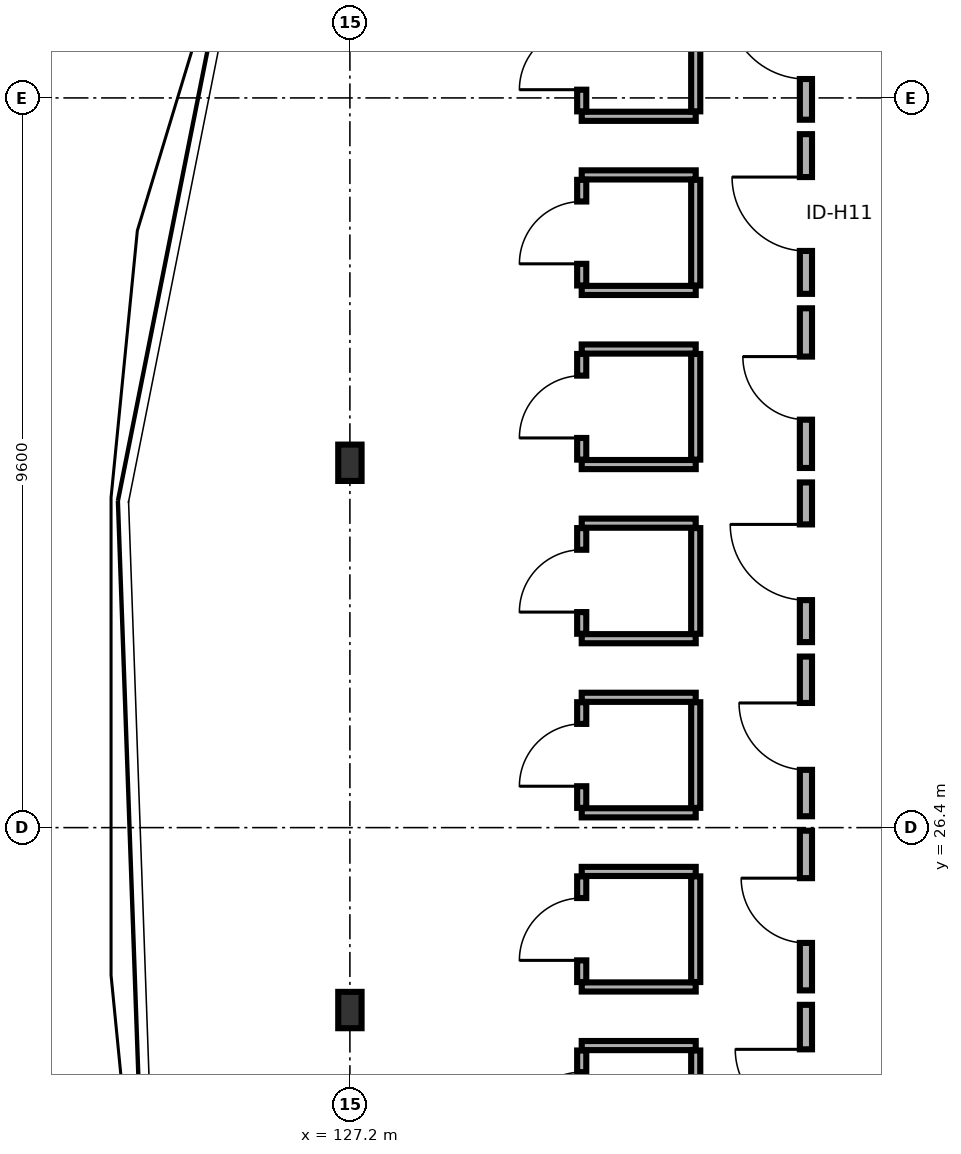
"""IFC4 building model, lengths in metres.
Left out: names, types, materials, properties, quantities, classifications, styles, units other than length and angle.
Written with IfcOpenShell. Run it as: python <this file> out.ifc"""

import sys

from ifc_helpers import new_model, si_unit, direction, frame, frame_2d, origin, origin_2d, place, context, subcontext, project, spatial, rectangle, i_section, extrude, element, fill, save


model = new_model("IFC4")
c1 = context("Model", 3, precision=1e-05, world=origin(), true_north=direction((0.0, 1.0)))
c2 = subcontext(c1, "Body", "Model", "MODEL_VIEW")
j1 = project(units=[si_unit("LENGTHUNIT", "METRE"), si_unit("PLANEANGLEUNIT", "RADIAN")], contexts=[c1])
p1 = place(None, origin())
s1 = spatial("IfcSite", under=j1, at=p1, CompositionType="ELEMENT")
p2 = place(p1, origin())
s2 = spatial("IfcBuilding", under=s1, at=p2, CompositionType="ELEMENT")
p3 = place(p2, frame((0.0, 0.0, 18.1)))
s3 = spatial("IfcBuildingStorey", under=s2, at=p3, CompositionType="ELEMENT", Elevation=18.1)
for number, where, z_axis, x_axis in (
    (1, (127.2, 31.2, 0.0), (0.0, 0.0, 1.0), (1.0, 0.0, 0.0)),
    (2, (127.2, 24.0, 0.0), (0.0, 0.0, 1.0), (1.0, 0.0, 0.0)),
):
    element("IfcColumn", number, at=place(p3, frame(where, z_axis=z_axis, x_axis=x_axis)), inside=s3, PredefinedType="COLUMN", context=c2, shape_type="SweptSolid", body=[
        extrude(i_section(OverallWidth=0.307, OverallDepth=0.478, WebThickness=0.021, FlangeThickness=0.04, FilletRadius=0.027, at=origin_2d()), origin(), (0.0, 0.0, 1.0), 3.4),
    ])
p4 = place(p3, frame((133.2, 35.713, 0.0), z_axis=(0.0, 0.0, 1.0), x_axis=(0.0, 1.0, 0.0)))
e3 = element("IfcWall", 3, at=p4, inside=s3, PredefinedType="PARTITIONING", context=c2, shape_type="SweptSolid", body=[
    extrude(rectangle(XDim=2.101, YDim=0.16, at=frame_2d((1.051, 0.0))), origin(), (0.0, 0.0, 1.0), 3.21),
])
p5 = place(p4, frame((0.535, 0.0, 0.0)))
e4 = element("IfcOpeningElement", 4, at=p5, cuts=e3, PredefinedType="OPENING", context=c2, shape_type="SweptSolid", body=[
    extrude(rectangle(XDim=1.03, YDim=2.05, at=frame_2d((0.515, 1.025))), frame((0.0, 0.09, 0.0), z_axis=(0.0, -1.0, 0.0), x_axis=(1.0, 0.0, 0.0)), (0.0, 0.0, 1.0), 0.18),
])
p6 = place(p3, frame((130.25, 35.758, 0.0), z_axis=(0.0, 0.0, 1.0), x_axis=(1.0, 0.0, 0.0)))
e5 = element("IfcWall", 5, at=p6, inside=s3, PredefinedType="PARTITIONING", context=c2, shape_type="SweptSolid", body=[
    extrude(rectangle(XDim=1.5, YDim=0.12, at=frame_2d((0.75, 0.0))), origin(), (0.0, 0.0, 1.0), 3.21),
])
p7 = place(p3, frame((130.25, 35.823, 0.0), z_axis=(0.0, 0.0, 1.0), x_axis=(0.0, 1.0, 0.0)))
e6 = element("IfcWall", 6, at=p7, inside=s3, PredefinedType="PARTITIONING", context=c2, shape_type="SweptSolid", body=[
    extrude(rectangle(XDim=1.39, YDim=0.12, at=frame_2d((0.695, 0.0))), origin(), (0.0, 0.0, 1.0), 3.21),
])
p8 = place(p7, frame((0.285, 0.0, 0.0)))
e7 = element("IfcOpeningElement", 7, at=p8, cuts=e6, PredefinedType="OPENING", context=c2, shape_type="SweptSolid", body=[
    extrude(rectangle(XDim=0.82, YDim=2.08, at=frame_2d((0.41, 1.04))), frame((0.0, 0.07, 0.0), z_axis=(0.0, -1.0, 0.0), x_axis=(1.0, 0.0, 0.0)), (0.0, 0.0, 1.0), 0.14),
])
p9 = place(p3, frame((131.75, 35.823, 0.0), z_axis=(0.0, 0.0, 1.0), x_axis=(0.0, 1.0, 0.0)))
e8 = element("IfcWall", 8, at=p9, inside=s3, PredefinedType="PARTITIONING", context=c2, shape_type="SweptSolid", body=[
    extrude(rectangle(XDim=1.39, YDim=0.12, at=frame_2d((0.695, 0.0))), origin(), (0.0, 0.0, 1.0), 3.21),
])
p10 = place(p3, frame((133.2, 33.422, 0.0), z_axis=(0.0, 0.0, 1.0), x_axis=(0.0, 1.0, 0.0)))
e9 = element("IfcWall", 9, at=p10, inside=s3, PredefinedType="PARTITIONING", context=c2, shape_type="SweptSolid", body=[
    extrude(rectangle(XDim=2.101, YDim=0.16, at=frame_2d((1.05, 0.0))), origin(), (0.0, 0.0, 1.0), 3.21),
])
p11 = place(p10, frame((0.564, 0.0, 0.0)))
e10 = element("IfcOpeningElement", 10, at=p11, cuts=e9, PredefinedType="OPENING", context=c2, shape_type="SweptSolid", body=[
    extrude(rectangle(XDim=0.972, YDim=2.16, at=frame_2d((0.486, 1.08))), frame((0.0, 0.09, 0.0), z_axis=(0.0, -1.0, 0.0), x_axis=(1.0, 0.0, 0.0)), (0.0, 0.0, 1.0), 0.18),
])
for number, where, z_axis, x_axis in (
    (11, (130.25, 33.467, 0.0), (0.0, 0.0, 1.0), (1.0, 0.0, 0.0)),
    (12, (130.25, 34.987, 0.0), (0.0, 0.0, 1.0), (1.0, 0.0, 0.0)),
):
    element("IfcWall", number, at=place(p3, frame(where, z_axis=z_axis, x_axis=x_axis)), inside=s3, PredefinedType="PARTITIONING", context=c2, shape_type="SweptSolid", body=[
        extrude(rectangle(XDim=1.5, YDim=0.12, at=frame_2d((0.75, 0.0))), origin(), (0.0, 0.0, 1.0), 3.21),
    ])
p12 = place(p3, frame((130.25, 33.532, 0.0), z_axis=(0.0, 0.0, 1.0), x_axis=(0.0, 1.0, 0.0)))
e13 = element("IfcWall", 13, at=p12, inside=s3, PredefinedType="PARTITIONING", context=c2, shape_type="SweptSolid", body=[
    extrude(rectangle(XDim=1.39, YDim=0.12, at=frame_2d((0.695, 0.0))), origin(), (0.0, 0.0, 1.0), 3.21),
])
p13 = place(p12, frame((0.285, 0.0, 0.0)))
e14 = element("IfcOpeningElement", 14, at=p13, cuts=e13, PredefinedType="OPENING", context=c2, shape_type="SweptSolid", body=[
    extrude(rectangle(XDim=0.82, YDim=2.08, at=frame_2d((0.41, 1.04))), frame((0.0, 0.07, 0.0), z_axis=(0.0, -1.0, 0.0), x_axis=(1.0, 0.0, 0.0)), (0.0, 0.0, 1.0), 0.14),
])
p14 = place(p3, frame((131.75, 33.532, 0.0), z_axis=(0.0, 0.0, 1.0), x_axis=(0.0, 1.0, 0.0)))
e15 = element("IfcWall", 15, at=p14, inside=s3, PredefinedType="PARTITIONING", context=c2, shape_type="SweptSolid", body=[
    extrude(rectangle(XDim=1.39, YDim=0.12, at=frame_2d((0.695, 0.0))), origin(), (0.0, 0.0, 1.0), 3.21),
])
p15 = place(p3, frame((133.2, 31.131, 0.0), z_axis=(0.0, 0.0, 1.0), x_axis=(0.0, 1.0, 0.0)))
e16 = element("IfcWall", 16, at=p15, inside=s3, PredefinedType="PARTITIONING", context=c2, shape_type="SweptSolid", body=[
    extrude(rectangle(XDim=2.101, YDim=0.16, at=frame_2d((1.051, 0.0))), origin(), (0.0, 0.0, 1.0), 2.745),
])
p16 = place(p15, frame((0.635, 0.0, 0.0)))
e17 = element("IfcOpeningElement", 17, at=p16, cuts=e16, PredefinedType="OPENING", context=c2, shape_type="SweptSolid", body=[
    extrude(rectangle(XDim=0.83, YDim=2.11, at=frame_2d((0.415, 1.055))), frame((0.0, 0.09, 0.0), z_axis=(0.0, -1.0, 0.0), x_axis=(1.0, 0.0, 0.0)), (0.0, 0.0, 1.0), 0.18),
])
p17 = place(p3, frame((130.25, 31.177, 0.0), z_axis=(0.0, 0.0, 1.0), x_axis=(1.0, 0.0, 0.0)))
e18 = element("IfcWall", 18, at=p17, inside=s3, PredefinedType="PARTITIONING", context=c2, shape_type="SweptSolid", body=[
    extrude(rectangle(XDim=1.5, YDim=0.12, at=frame_2d((0.75, 0.0))), origin(), (0.0, 0.0, 1.0), 2.745),
])
p18 = place(p3, frame((130.25, 32.696, 0.0), z_axis=(0.0, 0.0, 1.0), x_axis=(1.0, 0.0, 0.0)))
e19 = element("IfcWall", 19, at=p18, inside=s3, PredefinedType="PARTITIONING", context=c2, shape_type="SweptSolid", body=[
    extrude(rectangle(XDim=1.5, YDim=0.12, at=frame_2d((0.75, 0.0))), origin(), (0.0, 0.0, 1.0), 3.21),
])
p19 = place(p3, frame((130.25, 31.241, 0.0), z_axis=(0.0, 0.0, 1.0), x_axis=(0.0, 1.0, 0.0)))
e20 = element("IfcWall", 20, at=p19, inside=s3, PredefinedType="PARTITIONING", context=c2, shape_type="SweptSolid", body=[
    extrude(rectangle(XDim=1.39, YDim=0.12, at=frame_2d((0.695, 0.0))), origin(), (0.0, 0.0, 1.0), 2.745),
])
p20 = place(p19, frame((0.285, 0.0, 0.0)))
e21 = element("IfcOpeningElement", 21, at=p20, cuts=e20, PredefinedType="OPENING", context=c2, shape_type="SweptSolid", body=[
    extrude(rectangle(XDim=0.82, YDim=2.08, at=frame_2d((0.41, 1.04))), frame((0.0, 0.07, 0.0), z_axis=(0.0, -1.0, 0.0), x_axis=(1.0, 0.0, 0.0)), (0.0, 0.0, 1.0), 0.14),
])
p21 = place(p3, frame((131.75, 31.241, 0.0), z_axis=(0.0, 0.0, 1.0), x_axis=(0.0, 1.0, 0.0)))
e22 = element("IfcWall", 22, at=p21, inside=s3, PredefinedType="PARTITIONING", context=c2, shape_type="SweptSolid", body=[
    extrude(rectangle(XDim=1.39, YDim=0.12, at=frame_2d((0.695, 0.0))), origin(), (0.0, 0.0, 1.0), 2.745),
])
p22 = place(p3, frame((133.2, 28.841, 0.0), z_axis=(0.0, 0.0, 1.0), x_axis=(0.0, 1.0, 0.0)))
e23 = element("IfcWall", 23, at=p22, inside=s3, PredefinedType="PARTITIONING", context=c2, shape_type="SweptSolid", body=[
    extrude(rectangle(XDim=2.101, YDim=0.16, at=frame_2d((1.05, 0.0))), origin(), (0.0, 0.0, 1.0), 3.21),
])
p23 = place(p22, frame((0.552, 0.0, 0.0)))
e24 = element("IfcOpeningElement", 24, at=p23, cuts=e23, PredefinedType="OPENING", context=c2, shape_type="SweptSolid", body=[
    extrude(rectangle(XDim=0.996, YDim=2.1, at=frame_2d((0.498, 1.05))), frame((0.0, 0.09, 0.0), z_axis=(0.0, -1.0, 0.0), x_axis=(1.0, 0.0, 0.0)), (0.0, 0.0, 1.0), 0.18),
])
for number, where, z_axis, x_axis in (
    (25, (130.25, 28.885, 0.0), (0.0, 0.0, 1.0), (1.0, 0.0, 0.0)),
    (26, (130.25, 30.406, 0.0), (0.0, 0.0, 1.0), (1.0, 0.0, 0.0)),
):
    element("IfcWall", number, at=place(p3, frame(where, z_axis=z_axis, x_axis=x_axis)), inside=s3, PredefinedType="PARTITIONING", context=c2, shape_type="SweptSolid", body=[
        extrude(rectangle(XDim=1.5, YDim=0.12, at=frame_2d((0.75, 0.0))), origin(), (0.0, 0.0, 1.0), 3.21),
    ])
p24 = place(p3, frame((130.25, 28.95, 0.0), z_axis=(0.0, 0.0, 1.0), x_axis=(0.0, 1.0, 0.0)))
e27 = element("IfcWall", 27, at=p24, inside=s3, PredefinedType="PARTITIONING", context=c2, shape_type="SweptSolid", body=[
    extrude(rectangle(XDim=1.39, YDim=0.12, at=frame_2d((0.695, 0.0))), origin(), (0.0, 0.0, 1.0), 3.21),
])
p25 = place(p24, frame((0.285, 0.0, 0.0)))
e28 = element("IfcOpeningElement", 28, at=p25, cuts=e27, PredefinedType="OPENING", context=c2, shape_type="SweptSolid", body=[
    extrude(rectangle(XDim=0.82, YDim=2.08, at=frame_2d((0.41, 1.04))), frame((0.0, 0.07, 0.0), z_axis=(0.0, -1.0, 0.0), x_axis=(1.0, 0.0, 0.0)), (0.0, 0.0, 1.0), 0.14),
])
p26 = place(p3, frame((131.75, 28.95, 0.0), z_axis=(0.0, 0.0, 1.0), x_axis=(0.0, 1.0, 0.0)))
e29 = element("IfcWall", 29, at=p26, inside=s3, PredefinedType="PARTITIONING", context=c2, shape_type="SweptSolid", body=[
    extrude(rectangle(XDim=1.39, YDim=0.12, at=frame_2d((0.695, 0.0))), origin(), (0.0, 0.0, 1.0), 3.21),
])
p27 = place(p3, frame((133.2, 26.55, 0.0), z_axis=(0.0, 0.0, 1.0), x_axis=(0.0, 1.0, 0.0)))
e30 = element("IfcWall", 30, at=p27, inside=s3, PredefinedType="PARTITIONING", context=c2, shape_type="SweptSolid", body=[
    extrude(rectangle(XDim=2.101, YDim=0.16, at=frame_2d((1.05, 0.0))), origin(), (0.0, 0.0, 1.0), 3.21),
])
p28 = place(p27, frame((0.61, 0.0, 0.0)))
e31 = element("IfcOpeningElement", 31, at=p28, cuts=e30, PredefinedType="OPENING", context=c2, shape_type="SweptSolid", body=[
    extrude(rectangle(XDim=0.88, YDim=2.05, at=frame_2d((0.44, 1.025))), frame((0.0, 0.09, 0.0), z_axis=(0.0, -1.0, 0.0), x_axis=(1.0, 0.0, 0.0)), (0.0, 0.0, 1.0), 0.18),
])
for number, where, z_axis, x_axis in (
    (32, (130.25, 26.594, 0.0), (0.0, 0.0, 1.0), (1.0, 0.0, 0.0)),
    (33, (130.25, 28.115, 0.0), (0.0, 0.0, 1.0), (1.0, 0.0, 0.0)),
):
    element("IfcWall", number, at=place(p3, frame(where, z_axis=z_axis, x_axis=x_axis)), inside=s3, PredefinedType="PARTITIONING", context=c2, shape_type="SweptSolid", body=[
        extrude(rectangle(XDim=1.5, YDim=0.12, at=frame_2d((0.75, 0.0))), origin(), (0.0, 0.0, 1.0), 3.21),
    ])
p29 = place(p3, frame((130.25, 26.66, 0.0), z_axis=(0.0, 0.0, 1.0), x_axis=(0.0, 1.0, 0.0)))
e34 = element("IfcWall", 34, at=p29, inside=s3, PredefinedType="PARTITIONING", context=c2, shape_type="SweptSolid", body=[
    extrude(rectangle(XDim=1.39, YDim=0.12, at=frame_2d((0.695, 0.0))), origin(), (0.0, 0.0, 1.0), 3.21),
])
p30 = place(p29, frame((0.285, 0.0, 0.0)))
e35 = element("IfcOpeningElement", 35, at=p30, cuts=e34, PredefinedType="OPENING", context=c2, shape_type="SweptSolid", body=[
    extrude(rectangle(XDim=0.82, YDim=2.08, at=frame_2d((0.41, 1.04))), frame((0.0, 0.07, 0.0), z_axis=(0.0, -1.0, 0.0), x_axis=(1.0, 0.0, 0.0)), (0.0, 0.0, 1.0), 0.14),
])
p31 = place(p3, frame((131.75, 26.66, 0.0), z_axis=(0.0, 0.0, 1.0), x_axis=(0.0, 1.0, 0.0)))
e36 = element("IfcWall", 36, at=p31, inside=s3, PredefinedType="PARTITIONING", context=c2, shape_type="SweptSolid", body=[
    extrude(rectangle(XDim=1.39, YDim=0.12, at=frame_2d((0.695, 0.0))), origin(), (0.0, 0.0, 1.0), 3.21),
])
p32 = place(p3, frame((133.2, 24.259, 0.0), z_axis=(0.0, 0.0, 1.0), x_axis=(0.0, 1.0, 0.0)))
e37 = element("IfcWall", 37, at=p32, inside=s3, PredefinedType="PARTITIONING", context=c2, shape_type="SweptSolid", body=[
    extrude(rectangle(XDim=2.101, YDim=0.16, at=frame_2d((1.051, 0.0))), origin(), (0.0, 0.0, 1.0), 3.21),
])
p33 = place(p32, frame((0.625, 0.0, 0.0)))
e38 = element("IfcOpeningElement", 38, at=p33, cuts=e37, PredefinedType="OPENING", context=c2, shape_type="SweptSolid", body=[
    extrude(rectangle(XDim=0.852, YDim=2.1, at=frame_2d((0.426, 1.05))), frame((0.0, 0.09, 0.0), z_axis=(0.0, -1.0, 0.0), x_axis=(1.0, 0.0, 0.0)), (0.0, 0.0, 1.0), 0.18),
])
for number, where, z_axis, x_axis in (
    (39, (130.25, 24.304, 0.0), (0.0, 0.0, 1.0), (1.0, 0.0, 0.0)),
    (40, (130.25, 25.823, 0.0), (0.0, 0.0, 1.0), (1.0, 0.0, 0.0)),
):
    element("IfcWall", number, at=place(p3, frame(where, z_axis=z_axis, x_axis=x_axis)), inside=s3, PredefinedType="PARTITIONING", context=c2, shape_type="SweptSolid", body=[
        extrude(rectangle(XDim=1.5, YDim=0.12, at=frame_2d((0.75, 0.0))), origin(), (0.0, 0.0, 1.0), 3.21),
    ])
p34 = place(p3, frame((130.25, 24.369, 0.0), z_axis=(0.0, 0.0, 1.0), x_axis=(0.0, 1.0, 0.0)))
e41 = element("IfcWall", 41, at=p34, inside=s3, PredefinedType="PARTITIONING", context=c2, shape_type="SweptSolid", body=[
    extrude(rectangle(XDim=1.39, YDim=0.12, at=frame_2d((0.695, 0.0))), origin(), (0.0, 0.0, 1.0), 3.21),
])
p35 = place(p34, frame((0.285, 0.0, 0.0)))
e42 = element("IfcOpeningElement", 42, at=p35, cuts=e41, PredefinedType="OPENING", context=c2, shape_type="SweptSolid", body=[
    extrude(rectangle(XDim=0.82, YDim=2.08, at=frame_2d((0.41, 1.04))), frame((0.0, 0.07, 0.0), z_axis=(0.0, -1.0, 0.0), x_axis=(1.0, 0.0, 0.0)), (0.0, 0.0, 1.0), 0.14),
])
p36 = place(p3, frame((131.75, 24.369, 0.0), z_axis=(0.0, 0.0, 1.0), x_axis=(0.0, 1.0, 0.0)))
e43 = element("IfcWall", 43, at=p36, inside=s3, PredefinedType="PARTITIONING", context=c2, shape_type="SweptSolid", body=[
    extrude(rectangle(XDim=1.39, YDim=0.12, at=frame_2d((0.695, 0.0))), origin(), (0.0, 0.0, 1.0), 3.21),
])
p37 = place(p3, frame((133.2, 21.968, 0.0), z_axis=(0.0, 0.0, 1.0), x_axis=(0.0, 1.0, 0.0)))
e44 = element("IfcWall", 44, at=p37, inside=s3, PredefinedType="PARTITIONING", context=c2, shape_type="SweptSolid", body=[
    extrude(rectangle(XDim=2.101, YDim=0.16, at=frame_2d((1.05, 0.0))), origin(), (0.0, 0.0, 1.0), 2.745),
])
p38 = place(p37, frame((0.585, 0.0, 0.0)))
e45 = element("IfcOpeningElement", 45, at=p38, cuts=e44, PredefinedType="OPENING", context=c2, shape_type="SweptSolid", body=[
    extrude(rectangle(XDim=0.93, YDim=2.05, at=frame_2d((0.465, 1.025))), frame((0.0, 0.09, 0.0), z_axis=(0.0, -1.0, 0.0), x_axis=(1.0, 0.0, 0.0)), (0.0, 0.0, 1.0), 0.18),
])
p39 = place(p3, frame((130.25, 23.533, 0.0), z_axis=(0.0, 0.0, 1.0), x_axis=(1.0, 0.0, 0.0)))
e46 = element("IfcWall", 46, at=p39, inside=s3, PredefinedType="PARTITIONING", context=c2, shape_type="SweptSolid", body=[
    extrude(rectangle(XDim=1.5, YDim=0.12, at=frame_2d((0.75, 0.0))), origin(), (0.0, 0.0, 1.0), 3.21),
])
p40 = place(p3, frame((130.25, 22.078, 0.0), z_axis=(0.0, 0.0, 1.0), x_axis=(0.0, 1.0, 0.0)))
e47 = element("IfcWall", 47, at=p40, inside=s3, PredefinedType="PARTITIONING", context=c2, shape_type="SweptSolid", body=[
    extrude(rectangle(XDim=1.39, YDim=0.12, at=frame_2d((0.695, 0.0))), origin(), (0.0, 0.0, 1.0), 3.21),
])
p41 = place(p40, frame((0.285, 0.0, 0.0)))
e48 = element("IfcOpeningElement", 48, at=p41, cuts=e47, PredefinedType="OPENING", context=c2, shape_type="SweptSolid", body=[
    extrude(rectangle(XDim=0.82, YDim=2.08, at=frame_2d((0.41, 1.04))), frame((0.0, 0.07, 0.0), z_axis=(0.0, -1.0, 0.0), x_axis=(1.0, 0.0, 0.0)), (0.0, 0.0, 1.0), 0.14),
])
p42 = place(p3, frame((131.75, 22.078, 0.0), z_axis=(0.0, 0.0, 1.0), x_axis=(0.0, 1.0, 0.0)))
e49 = element("IfcWall", 49, at=p42, inside=s3, PredefinedType="PARTITIONING", context=c2, shape_type="SweptSolid", body=[
    extrude(rectangle(XDim=1.39, YDim=0.12, at=frame_2d((0.695, 0.0))), origin(), (0.0, 0.0, 1.0), 3.21),
])
p43 = place(p5, origin())
e50 = element("IfcDoor", 50, at=p43, inside=s3, OperationType="SINGLE_SWING_RIGHT", PredefinedType="DOOR", context=c2, shape_type="SweptSolid", body=[
    extrude(rectangle(XDim=1.03, YDim=2.05, at=frame_2d((0.515, 1.025))), frame((0.0, 0.025, 0.0), z_axis=(0.0, -1.0, 0.0), x_axis=(1.0, 0.0, 0.0)), (0.0, 0.0, 1.0), 0.05),
])
fill(e4, e50)
p44 = place(p8, origin())
e51 = element("IfcDoor", 51, at=p44, inside=s3, OperationType="SINGLE_SWING_LEFT", PredefinedType="DOOR", context=c2, shape_type="SweptSolid", body=[
    extrude(rectangle(XDim=0.82, YDim=2.08, at=frame_2d((0.41, 1.04))), frame((0.0, 0.025, 0.0), z_axis=(0.0, -1.0, 0.0), x_axis=(1.0, 0.0, 0.0)), (0.0, 0.0, 1.0), 0.05),
])
fill(e7, e51)
p45 = place(p11, origin())
e52 = element("IfcDoor", 52, at=p45, inside=s3, OperationType="SINGLE_SWING_RIGHT", PredefinedType="DOOR", context=c2, shape_type="SweptSolid", body=[
    extrude(rectangle(XDim=0.972, YDim=2.16, at=frame_2d((0.486, 1.08))), frame((0.0, 0.025, 0.0), z_axis=(0.0, -1.0, 0.0), x_axis=(1.0, 0.0, 0.0)), (0.0, 0.0, 1.0), 0.05),
])
fill(e10, e52)
p46 = place(p13, origin())
e53 = element("IfcDoor", 53, at=p46, inside=s3, OperationType="SINGLE_SWING_LEFT", PredefinedType="DOOR", context=c2, shape_type="SweptSolid", body=[
    extrude(rectangle(XDim=0.82, YDim=2.08, at=frame_2d((0.41, 1.04))), frame((0.0, 0.025, 0.0), z_axis=(0.0, -1.0, 0.0), x_axis=(1.0, 0.0, 0.0)), (0.0, 0.0, 1.0), 0.05),
])
fill(e14, e53)
p47 = place(p16, origin())
e54 = element("IfcDoor", 54, at=p47, inside=s3, OperationType="SINGLE_SWING_RIGHT", PredefinedType="DOOR", context=c2, shape_type="SweptSolid", body=[
    extrude(rectangle(XDim=0.83, YDim=2.11, at=frame_2d((0.415, 1.055))), frame((0.0, 0.025, 0.0), z_axis=(0.0, -1.0, 0.0), x_axis=(1.0, 0.0, 0.0)), (0.0, 0.0, 1.0), 0.05),
])
fill(e17, e54)
p48 = place(p20, origin())
e55 = element("IfcDoor", 55, at=p48, inside=s3, OperationType="SINGLE_SWING_LEFT", PredefinedType="DOOR", context=c2, shape_type="SweptSolid", body=[
    extrude(rectangle(XDim=0.82, YDim=2.08, at=frame_2d((0.41, 1.04))), frame((0.0, 0.025, 0.0), z_axis=(0.0, -1.0, 0.0), x_axis=(1.0, 0.0, 0.0)), (0.0, 0.0, 1.0), 0.05),
])
fill(e21, e55)
p49 = place(p23, origin())
e56 = element("IfcDoor", 56, at=p49, inside=s3, OperationType="SINGLE_SWING_RIGHT", PredefinedType="DOOR", context=c2, shape_type="SweptSolid", body=[
    extrude(rectangle(XDim=0.996, YDim=2.1, at=frame_2d((0.498, 1.05))), frame((0.0, 0.025, 0.0), z_axis=(0.0, -1.0, 0.0), x_axis=(1.0, 0.0, 0.0)), (0.0, 0.0, 1.0), 0.05),
])
fill(e24, e56)
p50 = place(p25, origin())
e57 = element("IfcDoor", 57, at=p50, inside=s3, OperationType="SINGLE_SWING_LEFT", PredefinedType="DOOR", context=c2, shape_type="SweptSolid", body=[
    extrude(rectangle(XDim=0.82, YDim=2.08, at=frame_2d((0.41, 1.04))), frame((0.0, 0.025, 0.0), z_axis=(0.0, -1.0, 0.0), x_axis=(1.0, 0.0, 0.0)), (0.0, 0.0, 1.0), 0.05),
])
fill(e28, e57)
p51 = place(p28, origin())
e58 = element("IfcDoor", 58, at=p51, inside=s3, OperationType="SINGLE_SWING_RIGHT", PredefinedType="DOOR", context=c2, shape_type="SweptSolid", body=[
    extrude(rectangle(XDim=0.88, YDim=2.05, at=frame_2d((0.44, 1.025))), frame((0.0, 0.025, 0.0), z_axis=(0.0, -1.0, 0.0), x_axis=(1.0, 0.0, 0.0)), (0.0, 0.0, 1.0), 0.05),
])
fill(e31, e58)
p52 = place(p30, origin())
e59 = element("IfcDoor", 59, at=p52, inside=s3, OperationType="SINGLE_SWING_LEFT", PredefinedType="DOOR", context=c2, shape_type="SweptSolid", body=[
    extrude(rectangle(XDim=0.82, YDim=2.08, at=frame_2d((0.41, 1.04))), frame((0.0, 0.025, 0.0), z_axis=(0.0, -1.0, 0.0), x_axis=(1.0, 0.0, 0.0)), (0.0, 0.0, 1.0), 0.05),
])
fill(e35, e59)
p53 = place(p33, origin())
e60 = element("IfcDoor", 60, at=p53, inside=s3, OperationType="SINGLE_SWING_RIGHT", PredefinedType="DOOR", context=c2, shape_type="SweptSolid", body=[
    extrude(rectangle(XDim=0.852, YDim=2.1, at=frame_2d((0.426, 1.05))), frame((0.0, 0.025, 0.0), z_axis=(0.0, -1.0, 0.0), x_axis=(1.0, 0.0, 0.0)), (0.0, 0.0, 1.0), 0.05),
])
fill(e38, e60)
p54 = place(p35, origin())
e61 = element("IfcDoor", 61, at=p54, inside=s3, OperationType="SINGLE_SWING_LEFT", PredefinedType="DOOR", context=c2, shape_type="SweptSolid", body=[
    extrude(rectangle(XDim=0.82, YDim=2.08, at=frame_2d((0.41, 1.04))), frame((0.0, 0.025, 0.0), z_axis=(0.0, -1.0, 0.0), x_axis=(1.0, 0.0, 0.0)), (0.0, 0.0, 1.0), 0.05),
])
fill(e42, e61)
p55 = place(p38, origin())
e62 = element("IfcDoor", 62, at=p55, inside=s3, OperationType="SINGLE_SWING_RIGHT", PredefinedType="DOOR", context=c2, shape_type="SweptSolid", body=[
    extrude(rectangle(XDim=0.93, YDim=2.05, at=frame_2d((0.465, 1.025))), frame((0.0, 0.025, 0.0), z_axis=(0.0, -1.0, 0.0), x_axis=(1.0, 0.0, 0.0)), (0.0, 0.0, 1.0), 0.05),
])
fill(e45, e62)
p56 = place(p41, origin())
e63 = element("IfcDoor", 63, at=p56, inside=s3, OperationType="SINGLE_SWING_LEFT", PredefinedType="DOOR", context=c2, shape_type="SweptSolid", body=[
    extrude(rectangle(XDim=0.82, YDim=2.08, at=frame_2d((0.41, 1.04))), frame((0.0, 0.025, 0.0), z_axis=(0.0, -1.0, 0.0), x_axis=(1.0, 0.0, 0.0)), (0.0, 0.0, 1.0), 0.05),
])
fill(e48, e63)
save(model, sys.argv[1])
